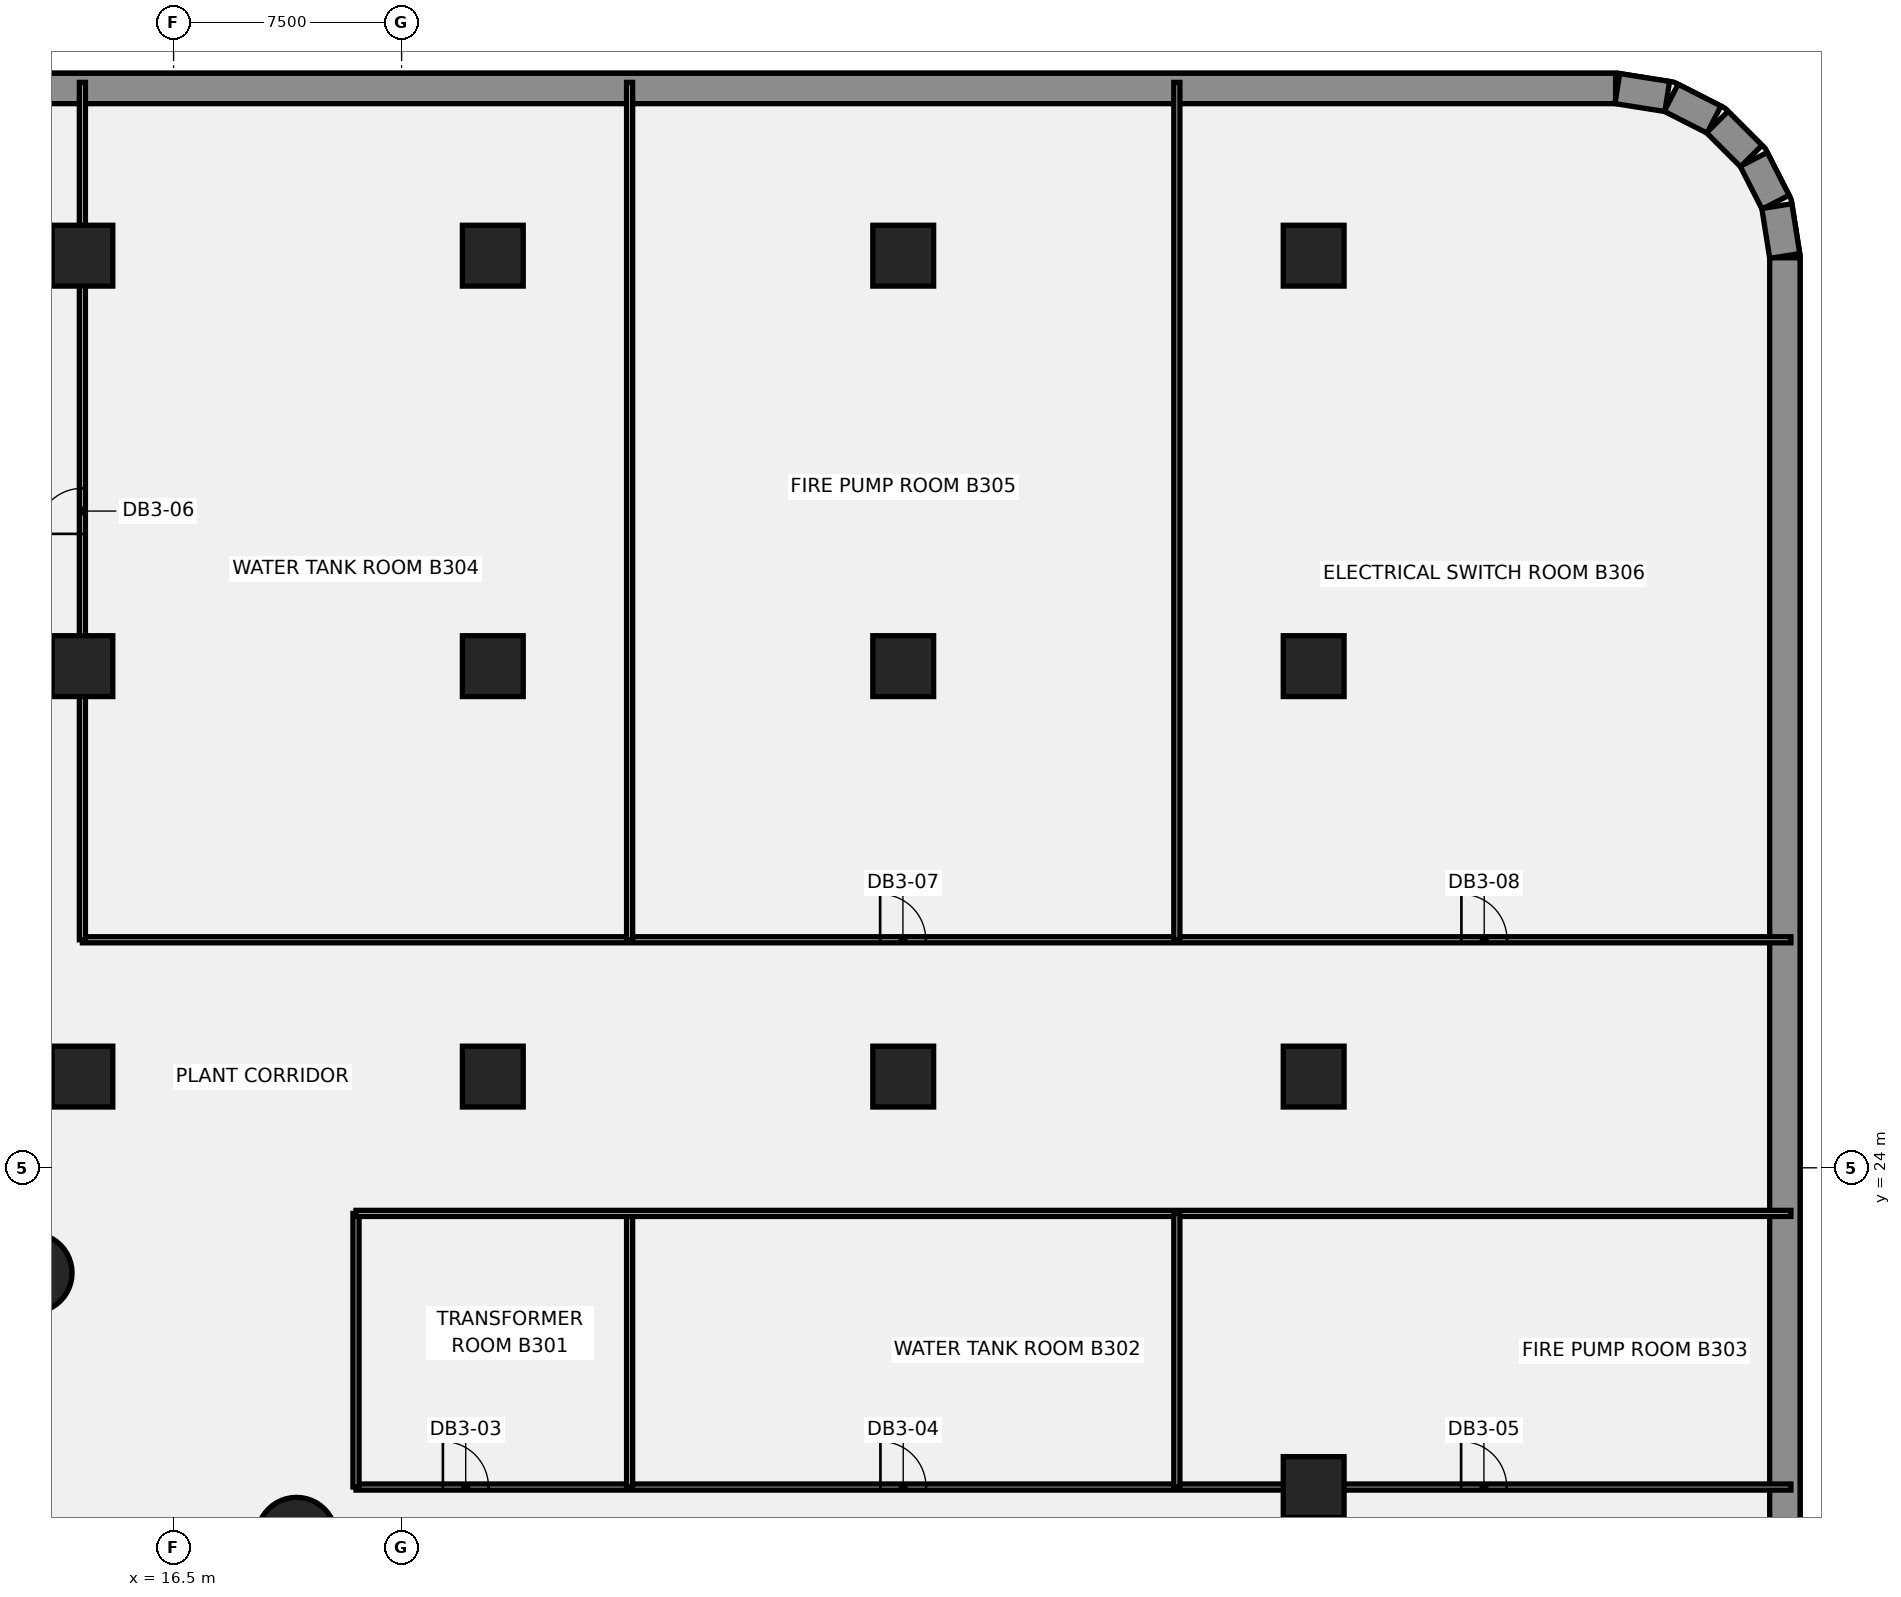
"""IFC4 building model, lengths in metres.
Left out: names, types, materials, properties, quantities, classifications, styles, units other than length and angle.
Written with IfcOpenShell. Run it as: python <this file> out.ifc"""

import sys

from ifc_helpers import new_model, si_unit, direction, frame, frame_2d, origin, origin_2d, place, context, subcontext, project, spatial, rectangle, circle, extrude, element, fill, save


model = new_model("IFC4")
c1 = context("Model", 3, precision=1e-05, world=origin(), true_north=direction((0.0, 1.0)))
c2 = subcontext(c1, "Body", "Model", "MODEL_VIEW")
j1 = project(units=[si_unit("LENGTHUNIT", "METRE"), si_unit("PLANEANGLEUNIT", "RADIAN")], contexts=[c1])
p1 = place(None, origin())
s1 = spatial("IfcSite", under=j1, at=p1, CompositionType="ELEMENT")
p2 = place(p1, origin())
s2 = spatial("IfcBuilding", under=s1, at=p2, CompositionType="ELEMENT")
p3 = place(p2, frame((0.0, 0.0, -21.0)))
s3 = spatial("IfcBuildingStorey", under=s2, at=p3, CompositionType="ELEMENT", Elevation=-21.0)
p4 = place(p3, frame((-63.931, 59.5, -0.3), z_axis=(0.0, 0.0, 1.0), x_axis=(1.0, 0.0, 0.0)))
e1 = element("IfcWall", 1, at=p4, inside=s3, PredefinedType="SOLIDWALL", context=c2, shape_type="SweptSolid", body=[
    extrude(rectangle(XDim=127.863, YDim=1.0, at=frame_2d((63.931, 0.0))), origin(), (0.0, 0.0, 1.0), 6.85),
])
p5 = place(p3, frame((63.99, 59.495, -0.3), z_axis=(0.0, 0.0, 1.0), x_axis=(0.987688946427, -0.156430639922, 0.0)))
e2 = element("IfcWall", 2, at=p5, inside=s3, PredefinedType="SOLIDWALL", context=c2, shape_type="SweptSolid", body=[
    extrude(rectangle(XDim=1.661, YDim=1.0, at=frame_2d((0.83, 0.0))), origin(), (0.0, 0.0, 1.0), 6.85),
])
for number, where, z_axis, x_axis in (
    (3, (65.759, 59.194, -0.3), (0.0, 0.0, 1.0), (0.891, -0.454, 0.0)),
    (4, (67.278, 58.396, -0.3), (0.0, 0.0, 1.0), (0.707, -0.707, 0.0)),
    (5, (68.476, 57.168, -0.3), (0.0, 0.0, 1.0), (0.454, -0.891, 0.0)),
):
    element("IfcWall", number, at=place(p3, frame(where, z_axis=z_axis, x_axis=x_axis)), inside=s3, PredefinedType="SOLIDWALL", context=c2, shape_type="SweptSolid", body=[
        extrude(rectangle(XDim=1.581, YDim=1.0, at=frame_2d((0.791, 0.0))), origin(), (0.0, 0.0, 1.0), 6.85),
    ])
p6 = place(p3, frame((69.236, 55.63, -0.3), z_axis=(0.0, 0.0, 1.0), x_axis=(0.156430639922, -0.987688946427, 0.0)))
e6 = element("IfcWall", 6, at=p6, inside=s3, PredefinedType="SOLIDWALL", context=c2, shape_type="SweptSolid", body=[
    extrude(rectangle(XDim=1.661, YDim=1.0, at=frame_2d((0.83, 0.0))), origin(), (0.0, 0.0, 1.0), 6.85),
])
p7 = place(p3, frame((69.5, 53.931, -0.3), z_axis=(0.0, 0.0, 1.0), x_axis=(0.0, -1.0, 0.0)))
e7 = element("IfcWall", 7, at=p7, inside=s3, PredefinedType="SOLIDWALL", context=c2, shape_type="SweptSolid", body=[
    extrude(rectangle(XDim=107.863, YDim=1.0, at=frame_2d((53.931, 0.0))), origin(), (0.0, 0.0, 1.0), 6.85),
])
for number, where, z_axis, x_axis in (
    (8, (20.543, 11.86, -0.3), (0.0, 0.0, 1.0), (1.0, 0.0, 0.0)),
    (9, (11.86, 20.543, -0.3), (0.0, 0.0, 1.0), (1.0, 0.0, 0.0)),
):
    element("IfcColumn", number, at=place(p3, frame(where, z_axis=z_axis, x_axis=x_axis)), inside=s3, PredefinedType="COLUMN", context=c2, shape_type="SweptSolid", body=[
        extrude(circle(Radius=1.3, at=origin_2d()), origin(), (0.0, 0.0, 1.0), 6.85),
    ])
for number, where, z_axis, x_axis in (
    (10, (13.5, 27.0, -0.3), (0.0, 0.0, 1.0), (1.0, 0.0, 0.0)),
    (11, (13.5, 40.5, -0.3), (0.0, 0.0, 1.0), (1.0, 0.0, 0.0)),
    (12, (13.5, 54.0, -0.3), (0.0, 0.0, 1.0), (1.0, 0.0, 0.0)),
    (13, (27.0, 27.0, -0.3), (0.0, 0.0, 1.0), (1.0, 0.0, 0.0)),
    (14, (27.0, 40.5, -0.3), (0.0, 0.0, 1.0), (1.0, 0.0, 0.0)),
    (15, (27.0, 54.0, -0.3), (0.0, 0.0, 1.0), (1.0, 0.0, 0.0)),
    (16, (40.5, 27.0, -0.3), (0.0, 0.0, 1.0), (1.0, 0.0, 0.0)),
    (17, (40.5, 40.5, -0.3), (0.0, 0.0, 1.0), (1.0, 0.0, 0.0)),
    (18, (40.5, 54.0, -0.3), (0.0, 0.0, 1.0), (1.0, 0.0, 0.0)),
    (19, (54.0, 13.5, -0.3), (0.0, 0.0, 1.0), (1.0, 0.0, 0.0)),
    (20, (54.0, 27.0, -0.3), (0.0, 0.0, 1.0), (1.0, 0.0, 0.0)),
    (21, (54.0, 40.5, -0.3), (0.0, 0.0, 1.0), (1.0, 0.0, 0.0)),
    (22, (54.0, 54.0, -0.3), (0.0, 0.0, 1.0), (1.0, 0.0, 0.0)),
):
    element("IfcColumn", number, at=place(p3, frame(where, z_axis=z_axis, x_axis=x_axis)), inside=s3, PredefinedType="COLUMN", context=c2, shape_type="SweptSolid", body=[
        extrude(rectangle(XDim=2.0, YDim=2.0, at=origin_2d()), origin(), (0.0, 0.0, 1.0), 6.85),
    ])
p8 = place(p3, frame((13.5, 31.5, 0.0), z_axis=(0.0, 0.0, 1.0), x_axis=(1.0, 0.0, 0.0)))
e23 = element("IfcWall", 23, at=p8, inside=s3, PredefinedType="PARTITIONING", context=c2, shape_type="SweptSolid", body=[
    extrude(rectangle(XDim=56.199, YDim=0.2, at=frame_2d((28.1, 0.0))), origin(), (0.0, 0.0, 1.0), 6.55),
])
p9 = place(p8, frame((26.24, 0.0, 0.0)))
e24 = element("IfcOpeningElement", 24, at=p9, cuts=e23, PredefinedType="OPENING", context=c2, shape_type="SweptSolid", body=[
    extrude(rectangle(XDim=1.5, YDim=2.1, at=frame_2d((0.75, 1.05))), frame((0.0, 0.11, 0.0), z_axis=(0.0, -1.0, 0.0), x_axis=(1.0, 0.0, 0.0)), (0.0, 0.0, 1.0), 0.22),
])
p10 = place(p8, frame((45.36, 0.0, 0.0)))
e25 = element("IfcOpeningElement", 25, at=p10, cuts=e23, PredefinedType="OPENING", context=c2, shape_type="SweptSolid", body=[
    extrude(rectangle(XDim=1.5, YDim=2.1, at=frame_2d((0.75, 1.05))), frame((0.0, 0.11, 0.0), z_axis=(0.0, -1.0, 0.0), x_axis=(1.0, 0.0, 0.0)), (0.0, 0.0, 1.0), 0.22),
])
p11 = place(p3, frame((13.5, 31.5, 0.0), z_axis=(0.0, 0.0, 1.0), x_axis=(0.0, 1.0, 0.0)))
e26 = element("IfcWall", 26, at=p11, inside=s3, PredefinedType="PARTITIONING", context=c2, shape_type="SweptSolid", body=[
    extrude(rectangle(XDim=28.199, YDim=0.2, at=frame_2d((14.1, 0.0))), origin(), (0.0, 0.0, 1.0), 6.55),
])
p12 = place(p11, frame((13.35, 0.0, 0.0)))
e27 = element("IfcOpeningElement", 27, at=p12, cuts=e26, PredefinedType="OPENING", context=c2, shape_type="SweptSolid", body=[
    extrude(rectangle(XDim=1.5, YDim=2.1, at=frame_2d((0.75, 1.05))), frame((0.0, 0.11, 0.0), z_axis=(0.0, -1.0, 0.0), x_axis=(1.0, 0.0, 0.0)), (0.0, 0.0, 1.0), 0.22),
])
p13 = place(p3, frame((22.5, 13.5, 0.0), z_axis=(0.0, 0.0, 1.0), x_axis=(1.0, 0.0, 0.0)))
e28 = element("IfcWall", 28, at=p13, inside=s3, PredefinedType="PARTITIONING", context=c2, shape_type="SweptSolid", body=[
    extrude(rectangle(XDim=47.199, YDim=0.2, at=frame_2d((23.6, 0.0))), origin(), (0.0, 0.0, 1.0), 6.55),
])
p14 = place(p13, frame((2.858, 0.0, 0.0)))
e29 = element("IfcOpeningElement", 29, at=p14, cuts=e28, PredefinedType="OPENING", context=c2, shape_type="SweptSolid", body=[
    extrude(rectangle(XDim=1.5, YDim=2.1, at=frame_2d((0.75, 1.05))), frame((0.0, 0.11, 0.0), z_axis=(0.0, -1.0, 0.0), x_axis=(1.0, 0.0, 0.0)), (0.0, 0.0, 1.0), 0.22),
])
p15 = place(p13, frame((17.25, 0.0, 0.0)))
e30 = element("IfcOpeningElement", 30, at=p15, cuts=e28, PredefinedType="OPENING", context=c2, shape_type="SweptSolid", body=[
    extrude(rectangle(XDim=1.5, YDim=2.1, at=frame_2d((0.75, 1.05))), frame((0.0, 0.11, 0.0), z_axis=(0.0, -1.0, 0.0), x_axis=(1.0, 0.0, 0.0)), (0.0, 0.0, 1.0), 0.22),
])
p16 = place(p13, frame((36.35, 0.0, 0.0)))
e31 = element("IfcOpeningElement", 31, at=p16, cuts=e28, PredefinedType="OPENING", context=c2, shape_type="SweptSolid", body=[
    extrude(rectangle(XDim=1.5, YDim=2.1, at=frame_2d((0.75, 1.05))), frame((0.0, 0.11, 0.0), z_axis=(0.0, -1.0, 0.0), x_axis=(1.0, 0.0, 0.0)), (0.0, 0.0, 1.0), 0.22),
])
for number, where, z_axis, x_axis in (
    (32, (31.5, 13.5, 0.0), (0.0, 0.0, 1.0), (0.0, 1.0, 0.0)),
    (33, (22.5, 13.5, 0.0), (0.0, 0.0, 1.0), (0.0, 1.0, 0.0)),
):
    element("IfcWall", number, at=place(p3, frame(where, z_axis=z_axis, x_axis=x_axis)), inside=s3, PredefinedType="PARTITIONING", context=c2, shape_type="SweptSolid", body=[
        extrude(rectangle(XDim=9.0, YDim=0.2, at=frame_2d((4.5, 0.0))), origin(), (0.0, 0.0, 1.0), 6.55),
    ])
p17 = place(p3, frame((22.5, 22.5, 0.0), z_axis=(0.0, 0.0, 1.0), x_axis=(1.0, 0.0, 0.0)))
e34 = element("IfcWall", 34, at=p17, inside=s3, PredefinedType="PARTITIONING", context=c2, shape_type="SweptSolid", body=[
    extrude(rectangle(XDim=47.199, YDim=0.2, at=frame_2d((23.6, 0.0))), origin(), (0.0, 0.0, 1.0), 6.55),
])
p18 = place(p3, frame((31.5, 31.5, 0.0), z_axis=(0.0, 0.0, 1.0), x_axis=(0.0, 1.0, 0.0)))
e35 = element("IfcWall", 35, at=p18, inside=s3, PredefinedType="PARTITIONING", context=c2, shape_type="SweptSolid", body=[
    extrude(rectangle(XDim=28.199, YDim=0.2, at=frame_2d((14.1, 0.0))), origin(), (0.0, 0.0, 1.0), 6.55),
])
p19 = place(p3, frame((49.5, 13.5, 0.0), z_axis=(0.0, 0.0, 1.0), x_axis=(0.0, 1.0, 0.0)))
e36 = element("IfcWall", 36, at=p19, inside=s3, PredefinedType="PARTITIONING", context=c2, shape_type="SweptSolid", body=[
    extrude(rectangle(XDim=9.0, YDim=0.2, at=frame_2d((4.5, 0.0))), origin(), (0.0, 0.0, 1.0), 6.55),
])
p20 = place(p3, frame((49.5, 31.5, 0.0), z_axis=(0.0, 0.0, 1.0), x_axis=(0.0, 1.0, 0.0)))
e37 = element("IfcWall", 37, at=p20, inside=s3, PredefinedType="PARTITIONING", context=c2, shape_type="SweptSolid", body=[
    extrude(rectangle(XDim=28.199, YDim=0.2, at=frame_2d((14.1, 0.0))), origin(), (0.0, 0.0, 1.0), 6.55),
])
p21 = place(p14, origin())
e38 = element("IfcDoor", 38, at=p21, inside=s3, OperationType="SINGLE_SWING_LEFT", PredefinedType="DOOR", context=c2, shape_type="SweptSolid", body=[
    extrude(rectangle(XDim=1.5, YDim=2.1, at=frame_2d((0.75, 1.05))), frame((0.0, 0.025, 0.0), z_axis=(0.0, -1.0, 0.0), x_axis=(1.0, 0.0, 0.0)), (0.0, 0.0, 1.0), 0.05),
])
fill(e29, e38)
p22 = place(p15, origin())
e39 = element("IfcDoor", 39, at=p22, inside=s3, OperationType="SINGLE_SWING_RIGHT", PredefinedType="DOOR", context=c2, shape_type="SweptSolid", body=[
    extrude(rectangle(XDim=1.5, YDim=2.1, at=frame_2d((0.75, 1.05))), frame((0.0, 0.025, 0.0), z_axis=(0.0, -1.0, 0.0), x_axis=(1.0, 0.0, 0.0)), (0.0, 0.0, 1.0), 0.05),
])
fill(e30, e39)
p23 = place(p16, origin())
e40 = element("IfcDoor", 40, at=p23, inside=s3, OperationType="SINGLE_SWING_LEFT", PredefinedType="DOOR", context=c2, shape_type="SweptSolid", body=[
    extrude(rectangle(XDim=1.5, YDim=2.1, at=frame_2d((0.75, 1.05))), frame((0.0, 0.025, 0.0), z_axis=(0.0, -1.0, 0.0), x_axis=(1.0, 0.0, 0.0)), (0.0, 0.0, 1.0), 0.05),
])
fill(e31, e40)
p24 = place(p12, origin())
e41 = element("IfcDoor", 41, at=p24, inside=s3, OperationType="SINGLE_SWING_RIGHT", PredefinedType="DOOR", context=c2, shape_type="SweptSolid", body=[
    extrude(rectangle(XDim=1.5, YDim=2.1, at=frame_2d((0.75, 1.05))), frame((0.0, 0.025, 0.0), z_axis=(0.0, -1.0, 0.0), x_axis=(1.0, 0.0, 0.0)), (0.0, 0.0, 1.0), 0.05),
])
fill(e27, e41)
p25 = place(p9, origin())
e42 = element("IfcDoor", 42, at=p25, inside=s3, OperationType="SINGLE_SWING_LEFT", PredefinedType="DOOR", context=c2, shape_type="SweptSolid", body=[
    extrude(rectangle(XDim=1.5, YDim=2.1, at=frame_2d((0.75, 1.05))), frame((0.0, 0.025, 0.0), z_axis=(0.0, -1.0, 0.0), x_axis=(1.0, 0.0, 0.0)), (0.0, 0.0, 1.0), 0.05),
])
fill(e24, e42)
p26 = place(p10, origin())
e43 = element("IfcDoor", 43, at=p26, inside=s3, OperationType="SINGLE_SWING_RIGHT", PredefinedType="DOOR", context=c2, shape_type="SweptSolid", body=[
    extrude(rectangle(XDim=1.5, YDim=2.1, at=frame_2d((0.75, 1.05))), frame((0.0, 0.025, 0.0), z_axis=(0.0, -1.0, 0.0), x_axis=(1.0, 0.0, 0.0)), (0.0, 0.0, 1.0), 0.05),
])
fill(e25, e43)
save(model, sys.argv[1])
